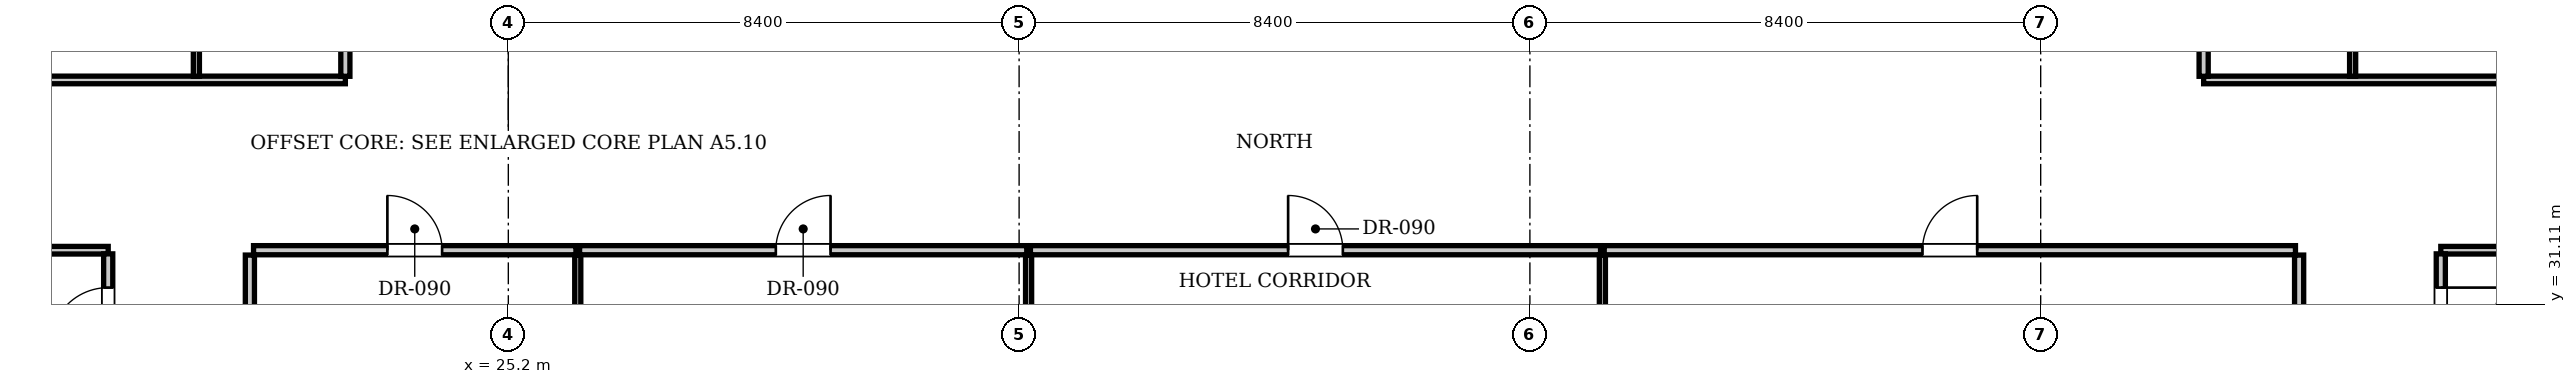
"""IFC4 building model, lengths in metres.
Left out: names, types, materials, properties, quantities, classifications, styles, units other than length and angle.
Written with IfcOpenShell. Run it as: python <this file> out.ifc"""

import sys

from ifc_helpers import new_model, si_unit, direction, frame, frame_2d, origin, place, context, subcontext, project, spatial, rectangle, extrude, element, fill, save


model = new_model("IFC4")
c1 = context("Model", 3, precision=1e-05, world=origin(), true_north=direction((0.0, 1.0)))
c2 = subcontext(c1, "Body", "Model", "MODEL_VIEW")
j1 = project(units=[si_unit("LENGTHUNIT", "METRE"), si_unit("PLANEANGLEUNIT", "RADIAN")], contexts=[c1])
p1 = place(None, origin())
s1 = spatial("IfcSite", under=j1, at=p1, CompositionType="ELEMENT")
p2 = place(p1, origin())
s2 = spatial("IfcBuilding", under=s1, at=p2, CompositionType="ELEMENT")
p3 = place(p2, frame((0.0, 0.0, 57.75)))
s3 = spatial("IfcBuildingStorey", under=s2, at=p3, CompositionType="ELEMENT", Elevation=57.75)
for number, where, z_axis, x_axis in (
    (1, (20.95, 23.98, 0.0), (0.0, 0.0, 1.0), (0.0, 1.0, 0.0)),
    (2, (54.65, 23.98, 0.0), (0.0, 0.0, 1.0), (0.0, 1.0, 0.0)),
):
    element("IfcWall", number, at=place(p3, frame(where, z_axis=z_axis, x_axis=x_axis)), inside=s3, PredefinedType="PARTITIONING", context=c2, shape_type="SweptSolid", body=[
        extrude(rectangle(XDim=7.94, YDim=0.15, at=frame_2d((3.97, 0.0))), origin(), (0.0, 0.0, 1.0), 3.255),
    ])
p4 = place(p3, frame((21.01, 32.0, 0.0), z_axis=(0.0, 0.0, 1.0), x_axis=(1.0, 0.0, 0.0)))
e3 = element("IfcWall", 3, at=p4, inside=s3, PredefinedType="PARTITIONING", context=c2, shape_type="SweptSolid", body=[
    extrude(rectangle(XDim=5.302, YDim=0.15, at=frame_2d((2.651, 0.0))), origin(), (0.0, 0.0, 1.0), 3.61),
])
p5 = place(p4, frame((2.201, 0.0, 0.0)))
e4 = element("IfcOpeningElement", 4, at=p5, cuts=e3, PredefinedType="OPENING", context=c2, shape_type="SweptSolid", body=[
    extrude(rectangle(XDim=0.9, YDim=2.1, at=frame_2d((0.45, 1.05))), frame((0.0, 0.085, 0.0), z_axis=(0.0, -1.0, 0.0), x_axis=(1.0, 0.0, 0.0)), (0.0, 0.0, 1.0), 0.17),
])
p6 = place(p3, frame((26.342, 23.98, 0.0), z_axis=(0.0, 0.0, 1.0), x_axis=(0.0, 1.0, 0.0)))
e5 = element("IfcWall", 5, at=p6, inside=s3, PredefinedType="PARTITIONING", context=c2, shape_type="SweptSolid", body=[
    extrude(rectangle(XDim=7.94, YDim=0.1, at=frame_2d((3.97, 0.0))), origin(), (0.0, 0.0, 1.0), 3.61),
])
p7 = place(p3, frame((26.372, 32.0, 0.0), z_axis=(0.0, 0.0, 1.0), x_axis=(1.0, 0.0, 0.0)))
e6 = element("IfcWall", 6, at=p7, inside=s3, PredefinedType="PARTITIONING", context=c2, shape_type="SweptSolid", body=[
    extrude(rectangle(XDim=7.354, YDim=0.15, at=frame_2d((3.677, 0.0))), origin(), (0.0, 0.0, 1.0), 3.61),
])
p8 = place(p7, frame((3.227, 0.0, 0.0)))
e7 = element("IfcOpeningElement", 7, at=p8, cuts=e6, PredefinedType="OPENING", context=c2, shape_type="SweptSolid", body=[
    extrude(rectangle(XDim=0.9, YDim=2.1, at=frame_2d((0.45, 1.05))), frame((0.0, 0.085, 0.0), z_axis=(0.0, -1.0, 0.0), x_axis=(1.0, 0.0, 0.0)), (0.0, 0.0, 1.0), 0.17),
])
p9 = place(p3, frame((33.756, 23.98, 0.0), z_axis=(0.0, 0.0, 1.0), x_axis=(0.0, 1.0, 0.0)))
e8 = element("IfcWall", 8, at=p9, inside=s3, PredefinedType="PARTITIONING", context=c2, shape_type="SweptSolid", body=[
    extrude(rectangle(XDim=7.94, YDim=0.1, at=frame_2d((3.97, 0.0))), origin(), (0.0, 0.0, 1.0), 2.988),
])
p10 = place(p3, frame((33.786, 32.0, 0.0), z_axis=(0.0, 0.0, 1.0), x_axis=(1.0, 0.0, 0.0)))
e9 = element("IfcWall", 9, at=p10, inside=s3, PredefinedType="PARTITIONING", context=c2, shape_type="SweptSolid", body=[
    extrude(rectangle(XDim=9.376, YDim=0.15, at=frame_2d((4.688, 0.0))), origin(), (0.0, 0.0, 1.0), 3.61),
])
p11 = place(p10, frame((4.238, 0.0, 0.0)))
e10 = element("IfcOpeningElement", 10, at=p11, cuts=e9, PredefinedType="OPENING", context=c2, shape_type="SweptSolid", body=[
    extrude(rectangle(XDim=0.9, YDim=2.1, at=frame_2d((0.45, 1.05))), frame((0.0, 0.085, 0.0), z_axis=(0.0, -1.0, 0.0), x_axis=(1.0, 0.0, 0.0)), (0.0, 0.0, 1.0), 0.17),
])
p12 = place(p3, frame((43.192, 23.98, 0.0), z_axis=(0.0, 0.0, 1.0), x_axis=(0.0, 1.0, 0.0)))
e11 = element("IfcWall", 11, at=p12, inside=s3, PredefinedType="PARTITIONING", context=c2, shape_type="SweptSolid", body=[
    extrude(rectangle(XDim=7.94, YDim=0.1, at=frame_2d((3.97, 0.0))), origin(), (0.0, 0.0, 1.0), 3.61),
])
p13 = place(p3, frame((43.222, 32.0, 0.0), z_axis=(0.0, 0.0, 1.0), x_axis=(1.0, 0.0, 0.0)))
e12 = element("IfcWall", 12, at=p13, inside=s3, PredefinedType="PARTITIONING", context=c2, shape_type="SweptSolid", body=[
    extrude(rectangle(XDim=11.368, YDim=0.15, at=frame_2d((5.684, 0.0))), origin(), (0.0, 0.0, 1.0), 3.61),
])
p14 = place(p13, frame((5.234, 0.0, 0.0)))
e13 = element("IfcOpeningElement", 13, at=p14, cuts=e12, PredefinedType="OPENING", context=c2, shape_type="SweptSolid", body=[
    extrude(rectangle(XDim=0.9, YDim=2.1, at=frame_2d((0.45, 1.05))), frame((0.0, 0.085, 0.0), z_axis=(0.0, -1.0, 0.0), x_axis=(1.0, 0.0, 0.0)), (0.0, 0.0, 1.0), 0.17),
])
p15 = place(p3, frame((10.9, 32.0, 0.0), z_axis=(0.0, 0.0, 1.0), x_axis=(1.0, 0.0, 0.0)))
e14 = element("IfcWall", 14, at=p15, inside=s3, PredefinedType="PARTITIONING", context=c2, shape_type="SweptSolid", body=[
    extrude(rectangle(XDim=7.72, YDim=0.125, at=frame_2d((3.86, 0.0))), origin(), (0.0, 0.0, 1.0), 3.61),
])
p16 = place(p3, frame((56.98, 32.0, 0.0), z_axis=(0.0, 0.0, 1.0), x_axis=(1.0, 0.0, 0.0)))
e15 = element("IfcWall", 15, at=p16, inside=s3, PredefinedType="PARTITIONING", context=c2, shape_type="SweptSolid", body=[
    extrude(rectangle(XDim=7.72, YDim=0.125, at=frame_2d((3.86, 0.0))), origin(), (0.0, 0.0, 1.0), 3.61),
])
p17 = place(p3, frame((18.62, 29.88, 0.0), z_axis=(0.0, 0.0, 1.0), x_axis=(0.0, 1.0, 0.0)))
e16 = element("IfcWall", 16, at=p17, inside=s3, PredefinedType="PARTITIONING", context=c2, shape_type="SweptSolid", body=[
    extrude(rectangle(XDim=2.06, YDim=0.15, at=frame_2d((1.03, 0.0))), origin(), (0.0, 0.0, 1.0), 3.61),
])
p18 = place(p17, frame((0.555, 0.0, 0.0)))
e17 = element("IfcOpeningElement", 17, at=p18, cuts=e16, PredefinedType="OPENING", context=c2, shape_type="SweptSolid", body=[
    extrude(rectangle(XDim=0.95, YDim=2.15, at=frame_2d((0.475, 1.075))), frame((0.0, 0.085, 0.0), z_axis=(0.0, -1.0, 0.0), x_axis=(1.0, 0.0, 0.0)), (0.0, 0.0, 1.0), 0.17),
])
p19 = place(p3, frame((56.98, 29.88, 0.0), z_axis=(0.0, 0.0, 1.0), x_axis=(0.0, 1.0, 0.0)))
e18 = element("IfcWall", 18, at=p19, inside=s3, PredefinedType="PARTITIONING", context=c2, shape_type="SweptSolid", body=[
    extrude(rectangle(XDim=2.06, YDim=0.15, at=frame_2d((1.03, 0.0))), origin(), (0.0, 0.0, 1.0), 3.61),
])
p20 = place(p19, frame((0.555, 0.0, 0.0)))
e19 = element("IfcOpeningElement", 19, at=p20, cuts=e18, PredefinedType="OPENING", context=c2, shape_type="SweptSolid", body=[
    extrude(rectangle(XDim=0.95, YDim=2.15, at=frame_2d((0.475, 1.075))), frame((0.0, 0.085, 0.0), z_axis=(0.0, -1.0, 0.0), x_axis=(1.0, 0.0, 0.0)), (0.0, 0.0, 1.0), 0.17),
])
p21 = place(p3, frame((10.9, 34.8, 0.0), z_axis=(0.0, 0.0, 1.0), x_axis=(1.0, 0.0, 0.0)))
e20 = element("IfcWall", 20, at=p21, inside=s3, PredefinedType="PARTITIONING", context=c2, shape_type="SweptSolid", body=[
    extrude(rectangle(XDim=11.62, YDim=0.125, at=frame_2d((5.81, 0.0))), origin(), (0.0, 0.0, 1.0), 3.61),
])
p22 = place(p3, frame((53.08, 34.8, 0.0), z_axis=(0.0, 0.0, 1.0), x_axis=(1.0, 0.0, 0.0)))
e21 = element("IfcWall", 21, at=p22, inside=s3, PredefinedType="PARTITIONING", context=c2, shape_type="SweptSolid", body=[
    extrude(rectangle(XDim=11.62, YDim=0.125, at=frame_2d((5.81, 0.0))), origin(), (0.0, 0.0, 1.0), 3.61),
])
p23 = place(p3, frame((22.52, 34.86, 0.0), z_axis=(0.0, 0.0, 1.0), x_axis=(0.0, 1.0, 0.0)))
e22 = element("IfcWall", 22, at=p23, inside=s3, PredefinedType="PARTITIONING", context=c2, shape_type="SweptSolid", body=[
    extrude(rectangle(XDim=2.29, YDim=0.15, at=frame_2d((1.145, 0.0))), origin(), (0.0, 0.0, 1.0), 3.61),
])
p24 = place(p3, frame((20.07, 34.86, 0.0), z_axis=(0.0, 0.0, 1.0), x_axis=(0.0, 1.0, 0.0)))
e23 = element("IfcWall", 23, at=p24, inside=s3, PredefinedType="PARTITIONING", context=c2, shape_type="SweptSolid", body=[
    extrude(rectangle(XDim=2.29, YDim=0.1, at=frame_2d((1.145, 0.0))), origin(), (0.0, 0.0, 1.0), 3.61),
])
p25 = place(p3, frame((53.08, 34.86, 0.0), z_axis=(0.0, 0.0, 1.0), x_axis=(0.0, 1.0, 0.0)))
e24 = element("IfcWall", 24, at=p25, inside=s3, PredefinedType="PARTITIONING", context=c2, shape_type="SweptSolid", body=[
    extrude(rectangle(XDim=2.29, YDim=0.15, at=frame_2d((1.145, 0.0))), origin(), (0.0, 0.0, 1.0), 3.61),
])
p26 = place(p3, frame((55.53, 34.86, 0.0), z_axis=(0.0, 0.0, 1.0), x_axis=(0.0, 1.0, 0.0)))
e25 = element("IfcWall", 25, at=p26, inside=s3, PredefinedType="PARTITIONING", context=c2, shape_type="SweptSolid", body=[
    extrude(rectangle(XDim=2.29, YDim=0.1, at=frame_2d((1.145, 0.0))), origin(), (0.0, 0.0, 1.0), 3.61),
])
p27 = place(p5, origin())
e26 = element("IfcDoor", 26, at=p27, inside=s3, OperationType="SINGLE_SWING_LEFT", PredefinedType="DOOR", context=c2, shape_type="SweptSolid", body=[
    extrude(rectangle(XDim=0.9, YDim=2.1, at=frame_2d((0.45, 1.05))), frame((0.0, 0.025, 0.0), z_axis=(0.0, -1.0, 0.0), x_axis=(1.0, 0.0, 0.0)), (0.0, 0.0, 1.0), 0.05),
])
fill(e4, e26)
p28 = place(p8, origin())
e27 = element("IfcDoor", 27, at=p28, inside=s3, OperationType="SINGLE_SWING_RIGHT", PredefinedType="DOOR", context=c2, shape_type="SweptSolid", body=[
    extrude(rectangle(XDim=0.9, YDim=2.1, at=frame_2d((0.45, 1.05))), frame((0.0, 0.025, 0.0), z_axis=(0.0, -1.0, 0.0), x_axis=(1.0, 0.0, 0.0)), (0.0, 0.0, 1.0), 0.05),
])
fill(e7, e27)
p29 = place(p11, origin())
e28 = element("IfcDoor", 28, at=p29, inside=s3, OperationType="SINGLE_SWING_LEFT", PredefinedType="DOOR", context=c2, shape_type="SweptSolid", body=[
    extrude(rectangle(XDim=0.9, YDim=2.1, at=frame_2d((0.45, 1.05))), frame((0.0, 0.025, 0.0), z_axis=(0.0, -1.0, 0.0), x_axis=(1.0, 0.0, 0.0)), (0.0, 0.0, 1.0), 0.05),
])
fill(e10, e28)
p30 = place(p14, origin())
e29 = element("IfcDoor", 29, at=p30, inside=s3, OperationType="SINGLE_SWING_RIGHT", PredefinedType="DOOR", context=c2, shape_type="SweptSolid", body=[
    extrude(rectangle(XDim=0.9, YDim=2.1, at=frame_2d((0.45, 1.05))), frame((0.0, 0.025, 0.0), z_axis=(0.0, -1.0, 0.0), x_axis=(1.0, 0.0, 0.0)), (0.0, 0.0, 1.0), 0.05),
])
fill(e13, e29)
p31 = place(p18, origin())
e30 = element("IfcDoor", 30, at=p31, inside=s3, OperationType="SINGLE_SWING_LEFT", PredefinedType="DOOR", context=c2, shape_type="SweptSolid", body=[
    extrude(rectangle(XDim=0.95, YDim=2.15, at=frame_2d((0.475, 1.075))), frame((0.0, 0.025, 0.0), z_axis=(0.0, -1.0, 0.0), x_axis=(1.0, 0.0, 0.0)), (0.0, 0.0, 1.0), 0.05),
])
fill(e17, e30)
p32 = place(p20, frame((0.95, 0.0, 0.0), z_axis=(0.0, 0.0, 1.0), x_axis=(-1.0, 0.0, 0.0)))
e31 = element("IfcDoor", 31, at=p32, inside=s3, OperationType="SINGLE_SWING_LEFT", PredefinedType="DOOR", context=c2, shape_type="SweptSolid", body=[
    extrude(rectangle(XDim=0.95, YDim=2.15, at=frame_2d((0.475, 1.075))), frame((0.0, 0.025, 0.0), z_axis=(0.0, -1.0, 0.0), x_axis=(1.0, 0.0, 0.0)), (0.0, 0.0, 1.0), 0.05),
])
fill(e19, e31)
save(model, sys.argv[1])
